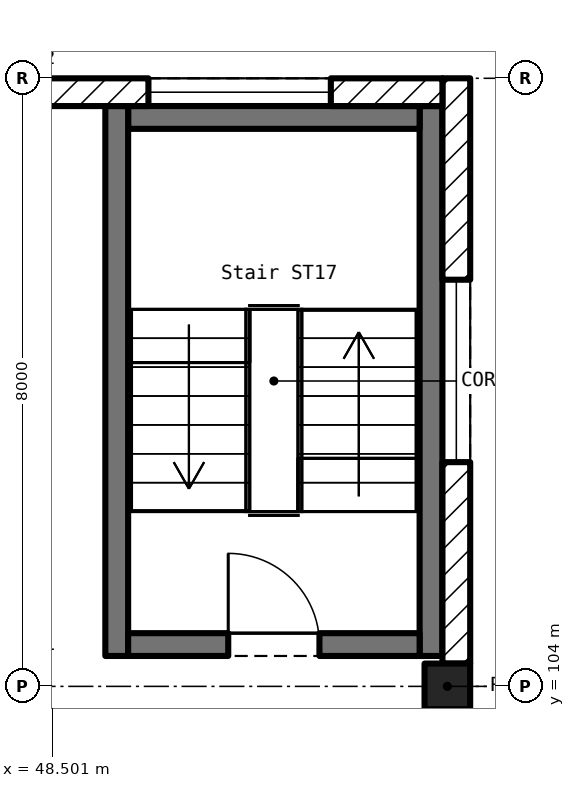
"""IFC4 building model, lengths in metres.
Left out: names, types, materials, properties, quantities, classifications, styles, units other than length and angle.
Written with IfcOpenShell. Run it as: python <this file> out.ifc"""

import sys

from ifc_helpers import new_model, si_unit, direction, frame, frame_2d, origin, origin_2d, place, context, subcontext, project, spatial, rectangle, extrude, element, fill, save


model = new_model("IFC4")
c1 = context("Model", 3, precision=1e-05, world=origin(), true_north=direction((0.0, 1.0)))
c2 = subcontext(c1, "Body", "Model", "MODEL_VIEW")
j1 = project(units=[si_unit("LENGTHUNIT", "METRE"), si_unit("PLANEANGLEUNIT", "RADIAN")], contexts=[c1])
p1 = place(None, origin())
s1 = spatial("IfcSite", under=j1, at=p1, CompositionType="ELEMENT")
p2 = place(p1, origin())
s2 = spatial("IfcBuilding", under=s1, at=p2, CompositionType="ELEMENT")
p3 = place(p2, frame((0.0, 0.0, 6.0)))
s3 = spatial("IfcBuildingStorey", under=s2, at=p3, CompositionType="ELEMENT", Elevation=6.0)
p4 = place(p3, frame((53.7, 104.0, 0.0), z_axis=(0.0, 0.0, 1.0), x_axis=(1.0, 0.0, 0.0)))
e1 = element("IfcColumn", 1, at=p4, inside=s3, PredefinedType="COLUMN", context=c2, shape_type="SweptSolid", body=[
    extrude(rectangle(XDim=0.6, YDim=0.6, at=origin_2d()), origin(), (0.0, 0.0, 1.0), 5.5),
])
p5 = place(p3, frame((53.818, 104.3, 0.0), z_axis=(0.0, 0.0, 1.0), x_axis=(0.0, 1.0, 0.0)))
e2 = element("IfcWall", 2, at=p5, inside=s3, PredefinedType="SOLIDWALL", context=c2, shape_type="SweptSolid", body=[
    extrude(rectangle(XDim=7.7, YDim=0.365, at=frame_2d((3.85, 0.0))), origin(), (0.0, 0.0, 1.0), 4.55),
])
p6 = place(p5, frame((2.65, 0.0, 1.0)))
e3 = element("IfcOpeningElement", 3, at=p6, cuts=e2, PredefinedType="OPENING", context=c2, shape_type="SweptSolid", body=[
    extrude(rectangle(XDim=2.4, YDim=2.0, at=frame_2d((1.2, 1.0))), frame((0.0, 0.195, 0.0), z_axis=(0.0, -1.0, 0.0), x_axis=(1.0, 0.0, 0.0)), (0.0, 0.0, 1.0), 0.389),
])
p7 = place(p3, frame((53.635, 111.817, 0.0), z_axis=(0.0, 0.0, 1.0), x_axis=(-1.0, 0.0, 0.0)))
e4 = element("IfcWall", 4, at=p7, inside=s3, PredefinedType="SOLIDWALL", context=c2, shape_type="SweptSolid", body=[
    extrude(rectangle(XDim=5.335, YDim=0.365, at=frame_2d((2.667, 0.0))), origin(), (0.0, 0.0, 1.0), 4.55),
])
p8 = place(p7, frame((1.468, 0.0, 1.0)))
e5 = element("IfcOpeningElement", 5, at=p8, cuts=e4, PredefinedType="OPENING", context=c2, shape_type="SweptSolid", body=[
    extrude(rectangle(XDim=2.4, YDim=2.0, at=frame_2d((1.2, 1.0))), frame((0.0, 0.195, 0.0), z_axis=(0.0, -1.0, 0.0), x_axis=(1.0, 0.0, 0.0)), (0.0, 0.0, 1.0), 0.389),
])
p9 = place(p3, frame((53.485, 104.4, 0.0), z_axis=(0.0, 0.0, 1.0), x_axis=(0.0, 1.0, 0.0)))
e6 = element("IfcWall", 6, at=p9, inside=s3, PredefinedType="SOLIDWALL", context=c2, shape_type="SweptSolid", body=[
    extrude(rectangle(XDim=7.235, YDim=0.3, at=frame_2d((3.618, 0.0))), origin(), (0.0, 0.0, 1.0), 5.5),
])
p10 = place(p3, frame((53.335, 111.485, 0.0), z_axis=(0.0, 0.0, 1.0), x_axis=(-1.0, 0.0, 0.0)))
e7 = element("IfcWall", 7, at=p10, inside=s3, PredefinedType="SOLIDWALL", context=c2, shape_type="SweptSolid", body=[
    extrude(rectangle(XDim=3.835, YDim=0.3, at=frame_2d((1.917, 0.0))), origin(), (0.0, 0.0, 1.0), 5.5),
])
p11 = place(p3, frame((49.35, 111.635, 0.0), z_axis=(0.0, 0.0, 1.0), x_axis=(0.0, -1.0, 0.0)))
e8 = element("IfcWall", 8, at=p11, inside=s3, PredefinedType="SOLIDWALL", context=c2, shape_type="SweptSolid", body=[
    extrude(rectangle(XDim=7.235, YDim=0.3, at=frame_2d((3.618, 0.0))), origin(), (0.0, 0.0, 1.0), 5.5),
])
p12 = place(p3, frame((49.5, 104.55, 0.0), z_axis=(0.0, 0.0, 1.0), x_axis=(1.0, 0.0, 0.0)))
e9 = element("IfcWall", 9, at=p12, inside=s3, PredefinedType="SOLIDWALL", context=c2, shape_type="SweptSolid", body=[
    extrude(rectangle(XDim=3.835, YDim=0.3, at=frame_2d((1.917, 0.0))), origin(), (0.0, 0.0, 1.0), 5.5),
])
p13 = place(p12, frame((1.317, 0.0, 0.0)))
e10 = element("IfcOpeningElement", 10, at=p13, cuts=e9, PredefinedType="OPENING", context=c2, shape_type="SweptSolid", body=[
    extrude(rectangle(XDim=1.2, YDim=2.1, at=frame_2d((0.6, 1.05))), frame((0.0, 0.162, 0.0), z_axis=(0.0, -1.0, 0.0), x_axis=(1.0, 0.0, 0.0)), (0.0, 0.0, 1.0), 0.324),
])
p14 = place(p6, origin())
e11 = element("IfcWindow", 11, at=p14, inside=s3, PartitioningType="DOUBLE_PANEL_VERTICAL", PredefinedType="WINDOW", context=c2, shape_type="SweptSolid", body=[
    extrude(rectangle(XDim=2.4, YDim=2.0, at=frame_2d((1.2, 1.0))), frame((0.0, 0.03, 0.0), z_axis=(0.0, -1.0, 0.0), x_axis=(1.0, 0.0, 0.0)), (0.0, 0.0, 1.0), 0.06),
])
fill(e3, e11)
p15 = place(p8, origin())
e12 = element("IfcWindow", 12, at=p15, inside=s3, PartitioningType="DOUBLE_PANEL_VERTICAL", PredefinedType="WINDOW", context=c2, shape_type="SweptSolid", body=[
    extrude(rectangle(XDim=2.4, YDim=2.0, at=frame_2d((1.2, 1.0))), frame((0.0, 0.03, 0.0), z_axis=(0.0, -1.0, 0.0), x_axis=(1.0, 0.0, 0.0)), (0.0, 0.0, 1.0), 0.06),
])
fill(e5, e12)
p16 = place(p13, origin())
e13 = element("IfcDoor", 13, at=p16, inside=s3, OperationType="SINGLE_SWING_LEFT", PredefinedType="DOOR", context=c2, shape_type="SweptSolid", body=[
    extrude(rectangle(XDim=1.2, YDim=2.1, at=frame_2d((0.6, 1.05))), frame((0.0, 0.025, 0.0), z_axis=(0.0, -1.0, 0.0), x_axis=(1.0, 0.0, 0.0)), (0.0, 0.0, 1.0), 0.05),
])
fill(e10, e13)
save(model, sys.argv[1])
